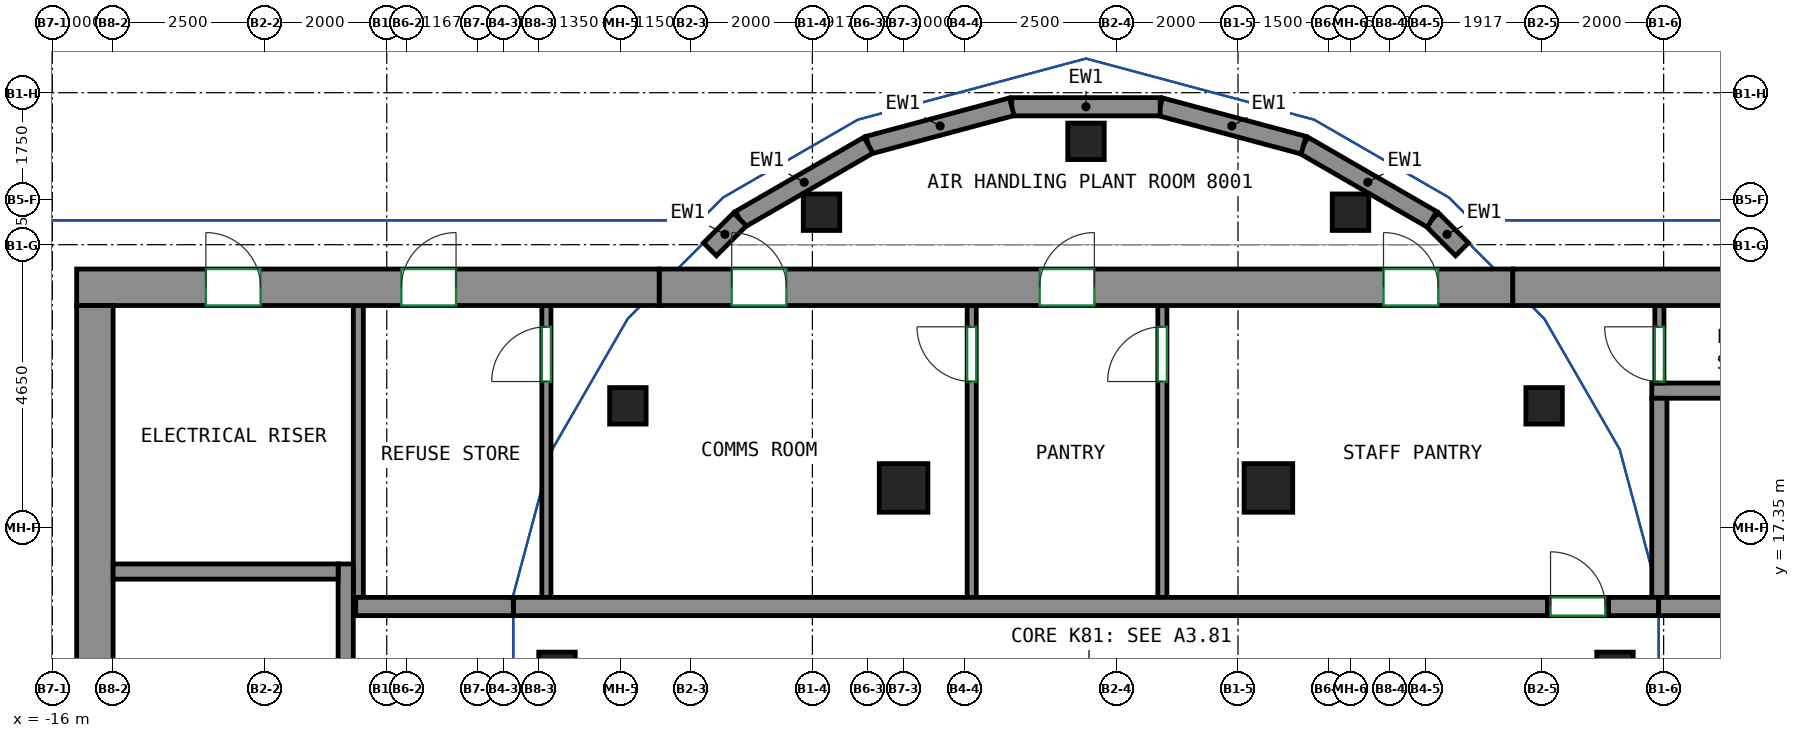
"""IFC4 building model, lengths in metres.
Left out: names, types, materials, properties, quantities, classifications, styles, units other than length and angle.
Written with IfcOpenShell. Run it as: python <this file> out.ifc"""

import sys

from ifc_helpers import new_model, si_unit, direction, frame, frame_2d, origin, origin_2d, place, context, subcontext, project, spatial, rectangle, extrude, source, transform, mapped, element, fill, save


model = new_model("IFC4")
c1 = context("Model", 3, precision=1e-05, world=origin(), true_north=direction((0.0, 1.0)))
c2 = subcontext(c1, "Body", "Model", "MODEL_VIEW")
j1 = project(units=[si_unit("LENGTHUNIT", "METRE"), si_unit("PLANEANGLEUNIT", "RADIAN")], contexts=[c1])
p1 = place(None, origin())
s1 = spatial("IfcSite", under=j1, at=p1, CompositionType="ELEMENT")
p2 = place(p1, origin())
s2 = spatial("IfcBuilding", under=s1, at=p2, CompositionType="ELEMENT")
p3 = place(p2, frame((0.0, 0.0, 318.8)))
s3 = spatial("IfcBuildingStorey", under=s2, at=p3, CompositionType="ELEMENT", Elevation=318.8)
m1 = source(origin(), c2, "Body", "SweptSolid", [
    extrude(rectangle(XDim=0.6, YDim=0.6, at=origin_2d()), origin(), (0.0, 0.0, 1.0), 4.6),
])
for number, where, z_axis, x_axis in (
    (1, (9.7, 15.0, 0.0), (0.0, 0.0, 1.0), (1.0, 0.0, 0.0)),
    (2, (8.534, 19.35, 0.0), (0.0, 0.0, 1.0), (1.0, 0.0, 0.0)),
    (3, (5.35, 22.534, 0.0), (0.0, 0.0, 1.0), (1.0, 0.0, 0.0)),
    (4, (1.0, 23.7, 0.0), (0.0, 0.0, 1.0), (1.0, 0.0, 0.0)),
    (5, (-3.35, 22.534, 0.0), (0.0, 0.0, 1.0), (1.0, 0.0, 0.0)),
    (6, (-6.534, 19.35, 0.0), (0.0, 0.0, 1.0), (1.0, 0.0, 0.0)),
    (7, (-7.7, 15.0, 0.0), (0.0, 0.0, 1.0), (1.0, 0.0, 0.0)),
):
    element("IfcColumn", number, at=place(p3, frame(where, z_axis=z_axis, x_axis=x_axis)), inside=s3, PredefinedType="COLUMN", context=c2, shape_type="MappedRepresentation", body=[
        mapped(m1, transform((0.0, 0.0, 0.0))),
    ])
m2 = source(origin(), c2, "Body", "SweptSolid", [
    extrude(rectangle(XDim=0.8, YDim=0.8, at=origin_2d()), origin(), (0.0, 0.0, 1.0), 4.6),
])
for number, where, z_axis, x_axis in (
    (8, (-2.0, 18.0, 0.0), (0.0, 0.0, 1.0), (1.0, 0.0, 0.0)),
    (9, (4.0, 18.0, 0.0), (0.0, 0.0, 1.0), (1.0, 0.0, 0.0)),
):
    element("IfcColumn", number, at=place(p3, frame(where, z_axis=z_axis, x_axis=x_axis)), inside=s3, PredefinedType="COLUMN", context=c2, shape_type="MappedRepresentation", body=[
        mapped(m2, transform((0.0, 0.0, 0.0))),
    ])
m3 = source(origin(), c2, "Body", "SweptSolid", [
    extrude(rectangle(XDim=14.04, YDim=0.6, at=frame_2d((7.02, 0.0))), origin(), (0.0, 0.0, 1.0), 4.6),
])
p4 = place(p3, frame((-6.02, 21.3, 0.0), z_axis=(0.0, 0.0, 1.0), x_axis=(1.0, 0.0, 0.0)))
e10 = element("IfcWall", 10, at=p4, inside=s3, PredefinedType="SHEAR", context=c2, shape_type="MappedRepresentation", body=[
    mapped(m3, transform((0.0, 0.0, 0.0))),
])
p5 = place(p4, frame((1.193, 0.0, 0.0)))
e11 = element("IfcOpeningElement", 11, at=p5, cuts=e10, PredefinedType="OPENING", context=c2, shape_type="SweptSolid", body=[
    extrude(rectangle(XDim=0.9, YDim=2.1, at=frame_2d((0.45, 1.05))), frame((0.0, 0.31, 0.0), z_axis=(0.0, -1.0, 0.0), x_axis=(1.0, 0.0, 0.0)), (0.0, 0.0, 1.0), 0.62),
])
p6 = place(p4, frame((6.258, 0.0, 0.0)))
e12 = element("IfcOpeningElement", 12, at=p6, cuts=e10, PredefinedType="OPENING", context=c2, shape_type="SweptSolid", body=[
    extrude(rectangle(XDim=0.9, YDim=2.1, at=frame_2d((0.45, 1.05))), frame((0.0, 0.31, 0.0), z_axis=(0.0, -1.0, 0.0), x_axis=(1.0, 0.0, 0.0)), (0.0, 0.0, 1.0), 0.62),
])
p7 = place(p4, frame((11.913, 0.0, 0.0)))
e13 = element("IfcOpeningElement", 13, at=p7, cuts=e10, PredefinedType="OPENING", context=c2, shape_type="SweptSolid", body=[
    extrude(rectangle(XDim=0.9, YDim=2.1, at=frame_2d((0.45, 1.05))), frame((0.0, 0.31, 0.0), z_axis=(0.0, -1.0, 0.0), x_axis=(1.0, 0.0, 0.0)), (0.0, 0.0, 1.0), 0.62),
])
m4 = source(origin(), c2, "Body", "SweptSolid", [
    extrude(rectangle(XDim=9.58, YDim=0.6, at=frame_2d((4.79, 0.0))), origin(), (0.0, 0.0, 1.0), 5.0),
])
p8 = place(p3, frame((-15.6, 21.3, -0.4), z_axis=(0.0, 0.0, 1.0), x_axis=(1.0, 0.0, 0.0)))
e14 = element("IfcWall", 14, at=p8, inside=s3, PredefinedType="SHEAR", context=c2, shape_type="MappedRepresentation", body=[
    mapped(m4, transform((0.0, 0.0, 0.0))),
])
p9 = place(p8, frame((5.34, 0.0, 0.4)))
e15 = element("IfcOpeningElement", 15, at=p9, cuts=e14, PredefinedType="OPENING", context=c2, shape_type="SweptSolid", body=[
    extrude(rectangle(XDim=0.9, YDim=2.1, at=frame_2d((0.45, 1.05))), frame((0.0, 0.31, 0.0), z_axis=(0.0, -1.0, 0.0), x_axis=(1.0, 0.0, 0.0)), (0.0, 0.0, 1.0), 0.62),
])
p10 = place(p8, frame((2.125, 0.0, 0.4)))
e16 = element("IfcOpeningElement", 16, at=p10, cuts=e14, PredefinedType="OPENING", context=c2, shape_type="SweptSolid", body=[
    extrude(rectangle(XDim=0.9, YDim=2.1, at=frame_2d((0.45, 1.05))), frame((0.0, 0.31, 0.0), z_axis=(0.0, -1.0, 0.0), x_axis=(1.0, 0.0, 0.0)), (0.0, 0.0, 1.0), 0.62),
])
m5 = source(origin(), c2, "Body", "SweptSolid", [
    extrude(rectangle(XDim=9.68, YDim=0.6, at=frame_2d((4.84, 0.0))), origin(), (0.0, 0.0, 1.0), 5.0),
])
p11 = place(p3, frame((8.02, 21.3, -0.4), z_axis=(0.0, 0.0, 1.0), x_axis=(1.0, 0.0, 0.0)))
e17 = element("IfcWall", 17, at=p11, inside=s3, PredefinedType="SHEAR", context=c2, shape_type="MappedRepresentation", body=[
    mapped(m5, transform((0.0, 0.0, 0.0))),
])
p12 = place(p11, frame((3.44, 0.0, 0.4)))
e18 = element("IfcOpeningElement", 18, at=p12, cuts=e17, PredefinedType="OPENING", context=c2, shape_type="SweptSolid", body=[
    extrude(rectangle(XDim=0.9, YDim=2.1, at=frame_2d((0.45, 1.05))), frame((0.0, 0.31, 0.0), z_axis=(0.0, -1.0, 0.0), x_axis=(1.0, 0.0, 0.0)), (0.0, 0.0, 1.0), 0.62),
])
p13 = place(p11, frame((6.655, 0.0, 0.4)))
e19 = element("IfcOpeningElement", 19, at=p13, cuts=e17, PredefinedType="OPENING", context=c2, shape_type="SweptSolid", body=[
    extrude(rectangle(XDim=0.9, YDim=2.1, at=frame_2d((0.45, 1.05))), frame((0.0, 0.31, 0.0), z_axis=(0.0, -1.0, 0.0), x_axis=(1.0, 0.0, 0.0)), (0.0, 0.0, 1.0), 0.62),
])
m6 = source(origin(), c2, "Body", "SweptSolid", [
    extrude(rectangle(XDim=12.0, YDim=0.6, at=frame_2d((6.0, 0.0))), origin(), (0.0, 0.0, 1.0), 5.0),
])
p14 = place(p3, frame((-15.3, 9.0, -0.4), z_axis=(0.0, 0.0, 1.0), x_axis=(0.0, 1.0, 0.0)))
e20 = element("IfcWall", 20, at=p14, inside=s3, PredefinedType="SHEAR", context=c2, shape_type="MappedRepresentation", body=[
    mapped(m6, transform((0.0, 0.0, 0.0))),
])
m7 = source(origin(), c2, "Body", "SweptSolid", [
    extrude(rectangle(XDim=7.75, YDim=0.25, at=frame_2d((3.875, 0.0))), origin(), (0.0, 0.0, 1.0), 5.0),
])
p15 = place(p3, frame((-11.175, 9.0, -0.4), z_axis=(0.0, 0.0, 1.0), x_axis=(0.0, 1.0, 0.0)))
e21 = element("IfcWall", 21, at=p15, inside=s3, PredefinedType="SHEAR", context=c2, shape_type="MappedRepresentation", body=[
    mapped(m7, transform((0.0, 0.0, 0.0))),
])
m8 = source(origin(), c2, "Body", "SweptSolid", [
    extrude(rectangle(XDim=3.7, YDim=0.25, at=frame_2d((1.85, 0.0))), origin(), (0.0, 0.0, 1.0), 5.0),
])
p16 = place(p3, frame((-15.0, 16.625, -0.4), z_axis=(0.0, 0.0, 1.0), x_axis=(1.0, 0.0, 0.0)))
e22 = element("IfcWall", 22, at=p16, inside=s3, PredefinedType="SHEAR", context=c2, shape_type="MappedRepresentation", body=[
    mapped(m8, transform((0.0, 0.0, 0.0))),
])
m9 = source(origin(), c2, "Body", "SweptSolid", [
    extrude(rectangle(XDim=17.009, YDim=0.3, at=frame_2d((8.504, 0.0))), origin(), (0.0, 0.0, 1.0), 4.6),
])
p17 = place(p3, frame((-8.419, 16.05, 0.0), z_axis=(0.0, 0.0, 1.0), x_axis=(1.0, 0.0, 0.0)))
e23 = element("IfcWall", 23, at=p17, inside=s3, PredefinedType="SHEAR", context=c2, shape_type="MappedRepresentation", body=[
    mapped(m9, transform((0.0, 0.0, 0.0))),
])
m10 = source(origin(), c2, "Body", "SweptSolid", [
    extrude(rectangle(XDim=2.591, YDim=0.3, at=frame_2d((1.296, 0.0))), origin(), (0.0, 0.0, 1.0), 5.0),
])
p18 = place(p3, frame((-11.01, 16.05, -0.4), z_axis=(0.0, 0.0, 1.0), x_axis=(1.0, 0.0, 0.0)))
e24 = element("IfcWall", 24, at=p18, inside=s3, PredefinedType="SHEAR", context=c2, shape_type="MappedRepresentation", body=[
    mapped(m10, transform((0.0, 0.0, 0.0))),
])
m11 = source(origin(), c2, "Body", "SweptSolid", [
    extrude(rectangle(XDim=0.829, YDim=0.3, at=frame_2d((0.414, 0.0))), origin(), (0.0, 0.0, 1.0), 4.6),
])
p19 = place(p3, frame((9.59, 16.05, 0.0), z_axis=(0.0, 0.0, 1.0), x_axis=(1.0, 0.0, 0.0)))
e25 = element("IfcWall", 25, at=p19, inside=s3, PredefinedType="SHEAR", context=c2, shape_type="MappedRepresentation", body=[
    mapped(m11, transform((0.0, 0.0, 0.0))),
])
m12 = source(origin(), c2, "Body", "SweptSolid", [
    extrude(rectangle(XDim=2.691, YDim=0.3, at=frame_2d((1.346, 0.0))), origin(), (0.0, 0.0, 1.0), 5.0),
])
p20 = place(p3, frame((10.419, 16.05, -0.4), z_axis=(0.0, 0.0, 1.0), x_axis=(1.0, 0.0, 0.0)))
e26 = element("IfcWall", 26, at=p20, inside=s3, PredefinedType="SHEAR", context=c2, shape_type="MappedRepresentation", body=[
    mapped(m12, transform((0.0, 0.0, 0.0))),
])
m13 = source(origin(), c2, "Body", "SweptSolid", [
    extrude(rectangle(XDim=1.0, YDim=0.3, at=frame_2d((0.5, 0.0))), origin(), (0.0, 0.0, 1.0), 1.35),
])
p21 = place(p3, frame((8.59, 16.05, 3.25), z_axis=(0.0, 0.0, 1.0), x_axis=(1.0, 0.0, 0.0)))
e27 = element("IfcWall", 27, at=p21, inside=s3, PredefinedType="SHEAR", context=c2, shape_type="MappedRepresentation", body=[
    mapped(m13, transform((0.0, 0.0, 0.0))),
])
m14 = source(origin(), c2, "Body", "SweptSolid", [
    extrude(rectangle(XDim=0.697, YDim=0.3, at=frame_2d((0.349, 0.0))), origin(), (0.0, 0.0, 1.0), 1.2),
])
p22 = place(p3, frame((7.184, 21.924, 0.0), z_axis=(0.0, 0.0, 1.0), x_axis=(-0.706931689754, 0.707281829274, 0.0)))
e28 = element("IfcWall", 28, at=p22, inside=s3, PredefinedType="SOLIDWALL", context=c2, shape_type="MappedRepresentation", body=[
    mapped(m14, transform((0.0, 0.0, 0.0))),
])
m15 = source(origin(), c2, "Body", "SweptSolid", [
    extrude(rectangle(XDim=2.44, YDim=0.3, at=frame_2d((1.22, 0.0))), origin(), (0.0, 0.0, 1.0), 1.2),
])
p23 = place(p3, frame((6.691, 22.417, 0.0), z_axis=(0.0, 0.0, 1.0), x_axis=(-0.866030657337, 0.49999090047, 0.0)))
e29 = element("IfcWall", 29, at=p23, inside=s3, PredefinedType="SOLIDWALL", context=c2, shape_type="MappedRepresentation", body=[
    mapped(m15, transform((0.0, 0.0, 0.0))),
])
m16 = source(origin(), c2, "Body", "SweptSolid", [
    extrude(rectangle(XDim=2.441, YDim=0.3, at=frame_2d((1.22, 0.0))), origin(), (0.0, 0.0, 1.0), 1.2),
])
p24 = place(p3, frame((4.578, 23.637, 0.0), z_axis=(0.0, 0.0, 1.0), x_axis=(-0.96593376363, 0.258789420724, 0.0)))
e30 = element("IfcWall", 30, at=p24, inside=s3, PredefinedType="SOLIDWALL", context=c2, shape_type="MappedRepresentation", body=[
    mapped(m16, transform((0.0, 0.0, 0.0))),
])
p25 = place(p3, frame((2.22, 24.269, 0.0), z_axis=(0.0, 0.0, 1.0), x_axis=(-1.0, 0.0, 0.0)))
e31 = element("IfcWall", 31, at=p25, inside=s3, PredefinedType="SOLIDWALL", context=c2, shape_type="MappedRepresentation", body=[
    mapped(m15, transform((0.0, 0.0, 0.0))),
])
p26 = place(p3, frame((-0.22, 24.269, 0.0), z_axis=(0.0, 0.0, 1.0), x_axis=(-0.96593376363, -0.258789420724, 0.0)))
e32 = element("IfcWall", 32, at=p26, inside=s3, PredefinedType="SOLIDWALL", context=c2, shape_type="MappedRepresentation", body=[
    mapped(m16, transform((0.0, 0.0, 0.0))),
])
p27 = place(p3, frame((-2.578, 23.637, 0.0), z_axis=(0.0, 0.0, 1.0), x_axis=(-0.866030657337, -0.49999090047, 0.0)))
e33 = element("IfcWall", 33, at=p27, inside=s3, PredefinedType="SOLIDWALL", context=c2, shape_type="MappedRepresentation", body=[
    mapped(m15, transform((0.0, 0.0, 0.0))),
])
p28 = place(p3, frame((-4.691, 22.417, 0.0), z_axis=(0.0, 0.0, 1.0), x_axis=(-0.706931689754, -0.707281829274, 0.0)))
e34 = element("IfcWall", 34, at=p28, inside=s3, PredefinedType="SOLIDWALL", context=c2, shape_type="MappedRepresentation", body=[
    mapped(m14, transform((0.0, 0.0, 0.0))),
])
m17 = source(origin(), c2, "Body", "SweptSolid", [
    extrude(rectangle(XDim=2.93, YDim=0.25, at=frame_2d((1.465, 0.0))), origin(), (0.0, 0.0, 1.0), 4.6),
])
p29 = place(p3, frame((10.305, 19.6, 0.0), z_axis=(0.0, 0.0, 1.0), x_axis=(1.0, 0.0, 0.0)))
e35 = element("IfcWall", 35, at=p29, inside=s3, PredefinedType="PARTITIONING", context=c2, shape_type="MappedRepresentation", body=[
    mapped(m17, transform((0.0, 0.0, 0.0))),
])
m18 = source(origin(), c2, "Body", "SweptSolid", [
    extrude(rectangle(XDim=4.8, YDim=0.165, at=frame_2d((2.4, 0.0))), origin(), (0.0, 0.0, 1.0), 4.6),
])
p30 = place(p3, frame((-10.968, 16.2, 0.0), z_axis=(0.0, 0.0, 1.0), x_axis=(0.0, 1.0, 0.0)))
e36 = element("IfcWall", 36, at=p30, inside=s3, PredefinedType="PARTITIONING", context=c2, shape_type="MappedRepresentation", body=[
    mapped(m18, transform((0.0, 0.0, 0.0))),
])
m19 = source(origin(), c2, "Body", "SweptSolid", [
    extrude(rectangle(XDim=3.275, YDim=0.25, at=frame_2d((1.638, 0.0))), origin(), (0.0, 0.0, 1.0), 4.6),
])
p31 = place(p3, frame((10.43, 16.2, 0.0), z_axis=(0.0, 0.0, 1.0), x_axis=(0.0, 1.0, 0.0)))
e37 = element("IfcWall", 37, at=p31, inside=s3, PredefinedType="PARTITIONING", context=c2, shape_type="MappedRepresentation", body=[
    mapped(m19, transform((0.0, 0.0, 0.0))),
])
m20 = source(origin(), c2, "Body", "SweptSolid", [
    extrude(rectangle(XDim=4.8, YDim=0.15, at=frame_2d((2.4, 0.0))), origin(), (0.0, 0.0, 1.0), 4.6),
])
p32 = place(p3, frame((-7.875, 16.2, 0.0), z_axis=(0.0, 0.0, 1.0), x_axis=(0.0, 1.0, 0.0)))
e38 = element("IfcWall", 38, at=p32, inside=s3, PredefinedType="PARTITIONING", context=c2, shape_type="MappedRepresentation", body=[
    mapped(m20, transform((0.0, 0.0, 0.0))),
])
p33 = place(p32, frame((3.55, 0.0, 0.0)))
e39 = element("IfcOpeningElement", 39, at=p33, cuts=e38, PredefinedType="OPENING", context=c2, shape_type="SweptSolid", body=[
    extrude(rectangle(XDim=0.9, YDim=2.1, at=frame_2d((0.45, 1.05))), frame((0.0, 0.085, 0.0), z_axis=(0.0, -1.0, 0.0), x_axis=(1.0, 0.0, 0.0)), (0.0, 0.0, 1.0), 0.17),
])
p34 = place(p3, frame((-0.88, 16.2, 0.0), z_axis=(0.0, 0.0, 1.0), x_axis=(0.0, 1.0, 0.0)))
e40 = element("IfcWall", 40, at=p34, inside=s3, PredefinedType="PARTITIONING", context=c2, shape_type="MappedRepresentation", body=[
    mapped(m20, transform((0.0, 0.0, 0.0))),
])
p35 = place(p34, frame((3.55, 0.0, 0.0)))
e41 = element("IfcOpeningElement", 41, at=p35, cuts=e40, PredefinedType="OPENING", context=c2, shape_type="SweptSolid", body=[
    extrude(rectangle(XDim=0.9, YDim=2.1, at=frame_2d((0.45, 1.05))), frame((0.0, 0.085, 0.0), z_axis=(0.0, -1.0, 0.0), x_axis=(1.0, 0.0, 0.0)), (0.0, 0.0, 1.0), 0.17),
])
p36 = place(p3, frame((2.256, 16.2, 0.0), z_axis=(0.0, 0.0, 1.0), x_axis=(0.0, 1.0, 0.0)))
e42 = element("IfcWall", 42, at=p36, inside=s3, PredefinedType="PARTITIONING", context=c2, shape_type="MappedRepresentation", body=[
    mapped(m20, transform((0.0, 0.0, 0.0))),
])
p37 = place(p36, frame((3.55, 0.0, 0.0)))
e43 = element("IfcOpeningElement", 43, at=p37, cuts=e42, PredefinedType="OPENING", context=c2, shape_type="SweptSolid", body=[
    extrude(rectangle(XDim=0.9, YDim=2.1, at=frame_2d((0.45, 1.05))), frame((0.0, 0.085, 0.0), z_axis=(0.0, -1.0, 0.0), x_axis=(1.0, 0.0, 0.0)), (0.0, 0.0, 1.0), 0.17),
])
m21 = source(origin(), c2, "Body", "SweptSolid", [
    extrude(rectangle(XDim=1.275, YDim=0.15, at=frame_2d((0.637, 0.0))), origin(), (0.0, 0.0, 1.0), 4.6),
])
p38 = place(p3, frame((10.43, 19.725, 0.0), z_axis=(0.0, 0.0, 1.0), x_axis=(0.0, 1.0, 0.0)))
e44 = element("IfcWall", 44, at=p38, inside=s3, PredefinedType="PARTITIONING", context=c2, shape_type="MappedRepresentation", body=[
    mapped(m21, transform((0.0, 0.0, 0.0))),
])
p39 = place(p38, frame((0.025, 0.0, 0.0)))
e45 = element("IfcOpeningElement", 45, at=p39, cuts=e44, PredefinedType="OPENING", context=c2, shape_type="SweptSolid", body=[
    extrude(rectangle(XDim=0.9, YDim=2.1, at=frame_2d((0.45, 1.05))), frame((0.0, 0.085, 0.0), z_axis=(0.0, -1.0, 0.0), x_axis=(1.0, 0.0, 0.0)), (0.0, 0.0, 1.0), 0.17),
])
m22 = source(origin(), c2, "Body", "SweptSolid", [
    extrude(rectangle(XDim=1.0, YDim=0.3, at=frame_2d((0.5, 0.0))), origin(), (0.0, 0.0, 1.0), 2.4),
])
p40 = place(p3, frame((8.59, 16.05, 0.0), z_axis=(0.0, 0.0, 1.0), x_axis=(1.0, 0.0, 0.0)))
e46 = element("IfcWall", 46, at=p40, inside=s3, PredefinedType="PARTITIONING", context=c2, shape_type="MappedRepresentation", body=[
    mapped(m22, transform((0.0, 0.0, 0.0))),
])
p41 = place(p40, frame((0.05, 0.0, 0.0)))
e47 = element("IfcOpeningElement", 47, at=p41, cuts=e46, PredefinedType="OPENING", context=c2, shape_type="SweptSolid", body=[
    extrude(rectangle(XDim=0.9, YDim=2.1, at=frame_2d((0.45, 1.05))), frame((0.0, 0.16, 0.0), z_axis=(0.0, -1.0, 0.0), x_axis=(1.0, 0.0, 0.0)), (0.0, 0.0, 1.0), 0.32),
])
p42 = place(p9, origin())
e48 = element("IfcDoor", 48, at=p42, inside=s3, OperationType="SINGLE_SWING_RIGHT", PredefinedType="DOOR", context=c2, shape_type="SweptSolid", body=[
    extrude(rectangle(XDim=0.9, YDim=2.1, at=frame_2d((0.45, 1.05))), frame((0.0, -0.155, 0.0), z_axis=(0.0, -1.0, 0.0), x_axis=(1.0, 0.0, 0.0)), (0.0, 0.0, 1.0), 0.05),
])
fill(e15, e48)
p43 = place(p5, origin())
e49 = element("IfcDoor", 49, at=p43, inside=s3, OperationType="SINGLE_SWING_LEFT", PredefinedType="DOOR", context=c2, shape_type="SweptSolid", body=[
    extrude(rectangle(XDim=0.9, YDim=2.1, at=frame_2d((0.45, 1.05))), frame((0.0, -0.155, 0.0), z_axis=(0.0, -1.0, 0.0), x_axis=(1.0, 0.0, 0.0)), (0.0, 0.0, 1.0), 0.05),
])
fill(e11, e49)
p44 = place(p6, origin())
e50 = element("IfcDoor", 50, at=p44, inside=s3, OperationType="SINGLE_SWING_RIGHT", PredefinedType="DOOR", context=c2, shape_type="SweptSolid", body=[
    extrude(rectangle(XDim=0.9, YDim=2.1, at=frame_2d((0.45, 1.05))), frame((0.0, -0.155, 0.0), z_axis=(0.0, -1.0, 0.0), x_axis=(1.0, 0.0, 0.0)), (0.0, 0.0, 1.0), 0.05),
])
fill(e12, e50)
p45 = place(p7, origin())
e51 = element("IfcDoor", 51, at=p45, inside=s3, OperationType="SINGLE_SWING_LEFT", PredefinedType="DOOR", context=c2, shape_type="SweptSolid", body=[
    extrude(rectangle(XDim=0.9, YDim=2.1, at=frame_2d((0.45, 1.05))), frame((0.0, -0.155, 0.0), z_axis=(0.0, -1.0, 0.0), x_axis=(1.0, 0.0, 0.0)), (0.0, 0.0, 1.0), 0.05),
])
fill(e13, e51)
p46 = place(p33, origin())
e52 = element("IfcDoor", 52, at=p46, inside=s3, OperationType="SINGLE_SWING_LEFT", PredefinedType="DOOR", context=c2, shape_type="SweptSolid", body=[
    extrude(rectangle(XDim=0.9, YDim=2.1, at=frame_2d((0.45, 1.05))), frame((0.0, 0.025, 0.0), z_axis=(0.0, -1.0, 0.0), x_axis=(1.0, 0.0, 0.0)), (0.0, 0.0, 1.0), 0.05),
])
fill(e39, e52)
p47 = place(p35, origin())
e53 = element("IfcDoor", 53, at=p47, inside=s3, OperationType="SINGLE_SWING_RIGHT", PredefinedType="DOOR", context=c2, shape_type="SweptSolid", body=[
    extrude(rectangle(XDim=0.9, YDim=2.1, at=frame_2d((0.45, 1.05))), frame((0.0, 0.025, 0.0), z_axis=(0.0, -1.0, 0.0), x_axis=(1.0, 0.0, 0.0)), (0.0, 0.0, 1.0), 0.05),
])
fill(e41, e53)
p48 = place(p37, origin())
e54 = element("IfcDoor", 54, at=p48, inside=s3, OperationType="SINGLE_SWING_LEFT", PredefinedType="DOOR", context=c2, shape_type="SweptSolid", body=[
    extrude(rectangle(XDim=0.9, YDim=2.1, at=frame_2d((0.45, 1.05))), frame((0.0, 0.025, 0.0), z_axis=(0.0, -1.0, 0.0), x_axis=(1.0, 0.0, 0.0)), (0.0, 0.0, 1.0), 0.05),
])
fill(e43, e54)
p49 = place(p39, origin())
e55 = element("IfcDoor", 55, at=p49, inside=s3, OperationType="SINGLE_SWING_RIGHT", PredefinedType="DOOR", context=c2, shape_type="SweptSolid", body=[
    extrude(rectangle(XDim=0.9, YDim=2.1, at=frame_2d((0.45, 1.05))), frame((0.0, 0.025, 0.0), z_axis=(0.0, -1.0, 0.0), x_axis=(1.0, 0.0, 0.0)), (0.0, 0.0, 1.0), 0.05),
])
fill(e45, e55)
p50 = place(p10, origin())
e56 = element("IfcDoor", 56, at=p50, inside=s3, OperationType="SINGLE_SWING_LEFT", PredefinedType="DOOR", context=c2, shape_type="SweptSolid", body=[
    extrude(rectangle(XDim=0.9, YDim=2.1, at=frame_2d((0.45, 1.05))), frame((0.0, -0.155, 0.0), z_axis=(0.0, -1.0, 0.0), x_axis=(1.0, 0.0, 0.0)), (0.0, 0.0, 1.0), 0.05),
])
fill(e16, e56)
p51 = place(p41, origin())
e57 = element("IfcDoor", 57, at=p51, inside=s3, OperationType="SINGLE_SWING_LEFT", PredefinedType="DOOR", context=c2, shape_type="SweptSolid", body=[
    extrude(rectangle(XDim=0.9, YDim=2.1, at=frame_2d((0.45, 1.05))), frame((0.0, 0.025, 0.0), z_axis=(0.0, -1.0, 0.0), x_axis=(1.0, 0.0, 0.0)), (0.0, 0.0, 1.0), 0.05),
])
fill(e47, e57)
save(model, sys.argv[1])
